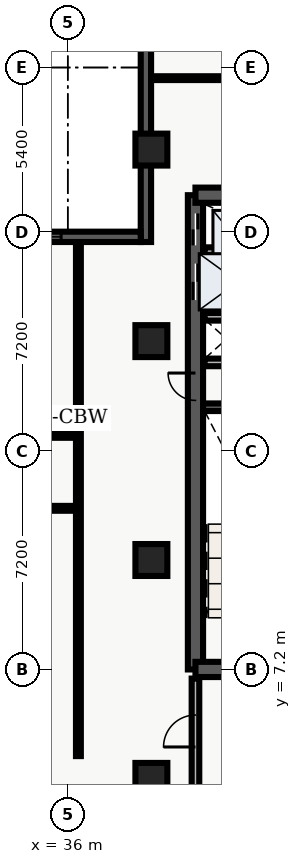
"""IFC4 building model, lengths in metres.
Left out: names, types, materials, properties, quantities, classifications, styles, units other than length and angle.
Written with IfcOpenShell. Run it as: python <this file> out.ifc"""

import sys

from ifc_helpers import new_model, entity, si_unit, converted_unit, direction, frame, origin_with_axes, origin_2d_with_axis, place, context, subcontext, project, spatial, polyline, rectangle, outline, extrude, element, fill, save


model = new_model("IFC4")
c1 = context("Model", 3, precision=1e-05, world=origin_with_axes(), true_north=direction((0.0, 1.0)))
c2 = subcontext(c1, "Body", "Model", "MODEL_VIEW")
j1 = project(units=[si_unit("LENGTHUNIT", "METRE"), converted_unit("PLANEANGLEUNIT", "DEGREE", entity("IfcPlaneAngleMeasure", 0.017), si_unit("PLANEANGLEUNIT", "RADIAN"), dimensions=[0, 0, 0, 0, 0, 0, 0])], contexts=[c1])
p1 = place(None, origin_with_axes())
s1 = spatial("IfcSite", under=j1, at=p1, CompositionType="ELEMENT")
p2 = place(p1, origin_with_axes())
s2 = spatial("IfcBuilding", under=s1, at=p2, CompositionType="ELEMENT")
p3 = place(p2, frame((0.0, 0.0, 152.4), z_axis=(0.0, 0.0, 1.0), x_axis=(1.0, 0.0, 0.0)))
s3 = spatial("IfcBuildingStorey", under=s2, at=p3, CompositionType="ELEMENT", Elevation=152.4)
p4 = place(p3, frame((40.2, 7.2, 0.0), z_axis=(0.0, 0.0, 1.0), x_axis=(0.0, 1.0, 0.0)))
e1 = element("IfcWall", 1, at=p4, inside=s3, PredefinedType="SHEAR", context=c2, shape_type="SweptSolid", body=[
    extrude(outline(polyline([(0.0, -0.25), (15.6, -0.25), (15.6, 0.25), (0.0, 0.25), (0.0, -0.25)])), origin_with_axes(), (0.0, 0.0, 1.0), 3.66),
])
p5 = place(p4, frame((14.475, 0.0, 0.0), z_axis=(0.0, 0.0, 1.0), x_axis=(1.0, 0.0, 0.0)))
e2 = element("IfcOpeningElement", 2, at=p5, cuts=e1, PredefinedType="OPENING", context=c2, shape_type="SweptSolid", body=[
    extrude(rectangle(XDim=1.05, YDim=0.52, at=origin_2d_with_axis()), origin_with_axes(), (0.0, 0.0, 1.0), 2.15),
])
p6 = place(p4, frame((12.75, 0.0, 0.0), z_axis=(0.0, 0.0, 1.0), x_axis=(1.0, 0.0, 0.0)))
e3 = element("IfcOpeningElement", 3, at=p6, cuts=e1, PredefinedType="OPENING", context=c2, shape_type="SweptSolid", body=[
    extrude(rectangle(XDim=1.2, YDim=0.52, at=origin_2d_with_axis()), origin_with_axes(), (0.0, 0.0, 1.0), 2.15),
])
p7 = place(p4, frame((9.3, 0.0, 0.0), z_axis=(0.0, 0.0, 1.0), x_axis=(1.0, 0.0, 0.0)))
e4 = element("IfcOpeningElement", 4, at=p7, cuts=e1, PredefinedType="OPENING", context=c2, shape_type="SweptSolid", body=[
    extrude(rectangle(XDim=0.9, YDim=0.52, at=origin_2d_with_axis()), origin_with_axes(), (0.0, 0.0, 1.0), 2.15),
])
p8 = place(p3, frame((40.2, 7.2, 0.0), z_axis=(0.0, 0.0, 1.0), x_axis=(1.0, 0.0, 0.0)))
e5 = element("IfcWall", 5, at=p8, inside=s3, PredefinedType="SHEAR", context=c2, shape_type="SweptSolid", body=[
    extrude(outline(polyline([(0.0, -0.25), (7.85, -0.25), (7.85, 0.25), (0.0, 0.25), (0.0, -0.25)])), origin_with_axes(), (0.0, 0.0, 1.0), 3.66),
])
p9 = place(p8, frame((2.175, 0.0, 0.0), z_axis=(0.0, 0.0, 1.0), x_axis=(1.0, 0.0, 0.0)))
e6 = element("IfcOpeningElement", 6, at=p9, cuts=e5, PredefinedType="OPENING", context=c2, shape_type="SweptSolid", body=[
    extrude(rectangle(XDim=1.05, YDim=0.52, at=origin_2d_with_axis()), origin_with_axes(), (0.0, 0.0, 1.0), 2.15),
])
p10 = place(p3, frame((40.2, 22.8, 0.0), z_axis=(0.0, 0.0, 1.0), x_axis=(1.0, 0.0, 0.0)))
e7 = element("IfcWall", 7, at=p10, inside=s3, PredefinedType="SHEAR", context=c2, shape_type="SweptSolid", body=[
    extrude(outline(polyline([(0.0, -0.25), (7.85, -0.25), (7.85, 0.25), (0.0, 0.25), (0.0, -0.25)])), origin_with_axes(), (0.0, 0.0, 1.0), 3.66),
])
p11 = place(p10, frame((5.775, 0.0, 0.0), z_axis=(0.0, 0.0, 1.0), x_axis=(1.0, 0.0, 0.0)))
e8 = element("IfcOpeningElement", 8, at=p11, cuts=e7, PredefinedType="OPENING", context=c2, shape_type="SweptSolid", body=[
    extrude(rectangle(XDim=1.05, YDim=0.52, at=origin_2d_with_axis()), origin_with_axes(), (0.0, 0.0, 1.0), 2.15),
])
p12 = place(p3, frame((40.45, 15.825, 0.0), z_axis=(0.0, 0.0, 1.0), x_axis=(1.0, 0.0, 0.0)))
e9 = element("IfcWall", 9, at=p12, inside=s3, PredefinedType="SHEAR", context=c2, shape_type="SweptSolid", body=[
    extrude(outline(polyline([(0.0, -0.125), (3.55, -0.125), (3.55, 0.125), (0.0, 0.125), (0.0, -0.125)])), origin_with_axes(), (0.0, 0.0, 1.0), 3.66),
])
p13 = place(p3, frame((40.5, 17.3, 0.0), z_axis=(0.0, 0.0, 1.0), x_axis=(1.0, 0.0, 0.0)))
e10 = element("IfcWall", 10, at=p13, inside=s3, PredefinedType="SOLIDWALL", context=c2, shape_type="SweptSolid", body=[
    extrude(outline(polyline([(0.0, -0.125), (3.5, -0.125), (3.5, 0.125), (0.0, 0.125), (0.0, -0.125)])), origin_with_axes(), (0.0, 0.0, 1.0), 2.7),
])
p14 = place(p13, frame((2.4, 0.0, 0.0), z_axis=(0.0, 0.0, 1.0), x_axis=(1.0, 0.0, 0.0)))
e11 = element("IfcOpeningElement", 11, at=p14, cuts=e10, PredefinedType="OPENING", context=c2, shape_type="SweptSolid", body=[
    extrude(rectangle(XDim=0.9, YDim=0.27, at=origin_2d_with_axis()), origin_with_axes(), (0.0, 0.0, 1.0), 2.15),
])
p15 = place(p3, frame((40.5, 18.8, 0.0), z_axis=(0.0, 0.0, 1.0), x_axis=(1.0, 0.0, 0.0)))
e12 = element("IfcWall", 12, at=p15, inside=s3, PredefinedType="SOLIDWALL", context=c2, shape_type="SweptSolid", body=[
    extrude(outline(polyline([(0.0, -0.125), (3.5, -0.125), (3.5, 0.125), (0.0, 0.125), (0.0, -0.125)])), origin_with_axes(), (0.0, 0.0, 1.0), 2.7),
])
p16 = place(p3, frame((40.2, 3.1, 0.0), z_axis=(0.0, 0.0, 1.0), x_axis=(0.0, 1.0, 0.0)))
e13 = element("IfcWall", 13, at=p16, inside=s3, PredefinedType="SOLIDWALL", context=c2, shape_type="SweptSolid", body=[
    extrude(outline(polyline([(0.0, -0.125), (3.8, -0.125), (3.8, 0.125), (0.0, 0.125), (0.0, -0.125)])), origin_with_axes(), (0.0, 0.0, 1.0), 2.7),
])
p17 = place(p16, frame((2.075, 0.0, 0.0), z_axis=(0.0, 0.0, 1.0), x_axis=(1.0, 0.0, 0.0)))
e14 = element("IfcOpeningElement", 14, at=p17, cuts=e13, PredefinedType="OPENING", context=c2, shape_type="SweptSolid", body=[
    extrude(rectangle(XDim=1.05, YDim=0.27, at=origin_2d_with_axis()), origin_with_axes(), (0.0, 0.0, 1.0), 2.15),
])
for number, where, z_axis, x_axis in (
    (15, (38.75, 3.6, 0.0), (0.0, 0.0, 1.0), (1.0, 0.0, 0.0)),
    (16, (38.75, 10.8, 0.0), (0.0, 0.0, 1.0), (1.0, 0.0, 0.0)),
    (17, (38.75, 18.0, 0.0), (0.0, 0.0, 1.0), (1.0, 0.0, 0.0)),
    (18, (38.75, 24.3, 0.0), (0.0, 0.0, 1.0), (1.0, 0.0, 0.0)),
):
    element("IfcColumn", number, at=place(p3, frame(where, z_axis=z_axis, x_axis=x_axis)), inside=s3, PredefinedType="COLUMN", context=c2, shape_type="SweptSolid", body=[
        extrude(rectangle(XDim=1.05, YDim=1.05, at=origin_2d_with_axis()), origin_with_axes(), (0.0, 0.0, 1.0), 3.9),
    ])
p18 = place(p3, frame((40.5, 20.96, 0.0), z_axis=(0.0, 0.0, 1.0), x_axis=(1.0, 0.0, 0.0)))
e19 = element("IfcWall", 19, at=p18, inside=s3, PredefinedType="SOLIDWALL", context=c2, shape_type="SweptSolid", body=[
    extrude(outline(polyline([(0.0, -0.125), (3.5, -0.125), (3.5, 0.125), (0.0, 0.125), (0.0, -0.125)])), origin_with_axes(), (0.0, 0.0, 1.0), 2.7),
])
p19 = place(p3, frame((21.15, 12.5, 0.0), z_axis=(0.0, 0.0, 1.0), x_axis=(1.0, 0.0, 0.0)))
e20 = element("IfcWall", 20, at=p19, inside=s3, PredefinedType="PARTITIONING", context=c2, shape_type="SweptSolid", body=[
    extrude(outline(polyline([(0.0, -0.08), (15.2, -0.08), (15.2, 0.08), (0.0, 0.08), (0.0, -0.08)])), origin_with_axes(), (0.0, 0.0, 1.0), 2.7),
])
p20 = place(p19, frame((2.313, 0.0, 0.0), z_axis=(0.0, 0.0, 1.0), x_axis=(1.0, 0.0, 0.0)))
e21 = element("IfcOpeningElement", 21, at=p20, cuts=e20, PredefinedType="OPENING", context=c2, shape_type="SweptSolid", body=[
    extrude(rectangle(XDim=1.0, YDim=0.18, at=origin_2d_with_axis()), origin_with_axes(), (0.0, 0.0, 1.0), 2.15),
])
p21 = place(p19, frame((6.912, 0.0, 0.0), z_axis=(0.0, 0.0, 1.0), x_axis=(1.0, 0.0, 0.0)))
e22 = element("IfcOpeningElement", 22, at=p21, cuts=e20, PredefinedType="OPENING", context=c2, shape_type="SweptSolid", body=[
    extrude(rectangle(XDim=1.0, YDim=0.18, at=origin_2d_with_axis()), origin_with_axes(), (0.0, 0.0, 1.0), 2.15),
])
p22 = place(p19, frame((12.248, 0.0, 0.0), z_axis=(0.0, 0.0, 1.0), x_axis=(1.0, 0.0, 0.0)))
e23 = element("IfcOpeningElement", 23, at=p22, cuts=e20, PredefinedType="OPENING", context=c2, shape_type="SweptSolid", body=[
    extrude(rectangle(XDim=1.2, YDim=0.18, at=origin_2d_with_axis()), origin_with_axes(), (0.0, 0.0, 1.0), 2.2),
])
p23 = place(p3, frame((21.15, 14.9, 0.0), z_axis=(0.0, 0.0, 1.0), x_axis=(1.0, 0.0, 0.0)))
e24 = element("IfcWall", 24, at=p23, inside=s3, PredefinedType="PARTITIONING", context=c2, shape_type="SweptSolid", body=[
    extrude(outline(polyline([(0.0, -0.08), (15.2, -0.08), (15.2, 0.08), (0.0, 0.08), (0.0, -0.08)])), origin_with_axes(), (0.0, 0.0, 1.0), 2.7),
])
p24 = place(p23, frame((3.47, 0.0, 0.0), z_axis=(0.0, 0.0, 1.0), x_axis=(1.0, 0.0, 0.0)))
e25 = element("IfcOpeningElement", 25, at=p24, cuts=e24, PredefinedType="OPENING", context=c2, shape_type="SweptSolid", body=[
    extrude(rectangle(XDim=1.0, YDim=0.18, at=origin_2d_with_axis()), origin_with_axes(), (0.0, 0.0, 1.0), 2.15),
])
p25 = place(p23, frame((10.94, 0.0, 0.0), z_axis=(0.0, 0.0, 1.0), x_axis=(1.0, 0.0, 0.0)))
e26 = element("IfcOpeningElement", 26, at=p25, cuts=e24, PredefinedType="OPENING", context=c2, shape_type="SweptSolid", body=[
    extrude(rectangle(XDim=1.0, YDim=0.18, at=origin_2d_with_axis()), origin_with_axes(), (0.0, 0.0, 1.0), 2.15),
])
p26 = place(p3, frame((36.35, 4.35, 0.0), z_axis=(0.0, 0.0, 1.0), x_axis=(0.0, 1.0, 0.0)))
e27 = element("IfcWall", 27, at=p26, inside=s3, PredefinedType="PARTITIONING", context=c2, shape_type="SweptSolid", body=[
    extrude(outline(polyline([(0.0, -0.08), (16.95, -0.08), (16.95, 0.08), (0.0, 0.08), (0.0, -0.08)])), origin_with_axes(), (0.0, 0.0, 1.0), 2.7),
])
p27 = place(p3, frame((38.735, 26.65, 0.0), z_axis=(0.0, 0.0, 1.0), x_axis=(1.0, 0.0, 0.0)))
e28 = element("IfcWall", 28, at=p27, inside=s3, PredefinedType="PARTITIONING", context=c2, shape_type="SweptSolid", body=[
    extrude(outline(polyline([(0.0, -0.062), (20.905, -0.062), (20.905, 0.062), (0.0, 0.062), (0.0, -0.062)])), origin_with_axes(), (0.0, 0.0, 1.0), 2.7),
])
p28 = place(p27, frame((4.265, 0.0, 0.0), z_axis=(0.0, 0.0, 1.0), x_axis=(1.0, 0.0, 0.0)))
e29 = element("IfcOpeningElement", 29, at=p28, cuts=e28, PredefinedType="OPENING", context=c2, shape_type="SweptSolid", body=[
    extrude(rectangle(XDim=1.0, YDim=0.145, at=origin_2d_with_axis()), origin_with_axes(), (0.0, 0.0, 1.0), 2.15),
])
p29 = place(p3, frame((38.57, 21.26, 0.0), z_axis=(0.0, 0.0, 1.0), x_axis=(0.0, 1.0, 0.0)))
e30 = element("IfcWall", 30, at=p29, inside=s3, PredefinedType="SOLIDWALL", context=c2, shape_type="SweptSolid", body=[
    extrude(outline(polyline([(0.0, -0.17), (7.54, -0.17), (7.54, 0.17), (0.0, 0.17), (0.0, -0.17)])), origin_with_axes(), (0.0, 0.0, 1.0), 3.66),
])
p30 = place(p3, frame((22.387, 21.43, 0.0), z_axis=(0.0, 0.0, 1.0), x_axis=(1.0, 0.0, 0.0)))
e31 = element("IfcWall", 31, at=p30, inside=s3, PredefinedType="SOLIDWALL", context=c2, shape_type="SweptSolid", body=[
    extrude(outline(polyline([(0.0, -0.17), (16.013, -0.17), (16.013, 0.17), (0.0, 0.17), (0.0, -0.17)])), origin_with_axes(), (0.0, 0.0, 1.0), 3.66),
])
p31 = place(p30, frame((3.069, 0.0, 0.45), z_axis=(0.0, 0.0, 1.0), x_axis=(1.0, 0.0, 0.0)))
e32 = element("IfcOpeningElement", 32, at=p31, cuts=e31, PredefinedType="OPENING", context=c2, shape_type="SweptSolid", body=[
    extrude(rectangle(XDim=1.8, YDim=0.36, at=origin_2d_with_axis()), origin_with_axes(), (0.0, 0.0, 1.0), 2.1),
])
p32 = place(p30, frame((8.006, 0.0, 0.45), z_axis=(0.0, 0.0, 1.0), x_axis=(1.0, 0.0, 0.0)))
e33 = element("IfcOpeningElement", 33, at=p32, cuts=e31, PredefinedType="OPENING", context=c2, shape_type="SweptSolid", body=[
    extrude(rectangle(XDim=1.8, YDim=0.36, at=origin_2d_with_axis()), origin_with_axes(), (0.0, 0.0, 1.0), 2.1),
])
p33 = place(p30, frame((12.494, 0.0, 0.45), z_axis=(0.0, 0.0, 1.0), x_axis=(1.0, 0.0, 0.0)))
e34 = element("IfcOpeningElement", 34, at=p33, cuts=e31, PredefinedType="OPENING", context=c2, shape_type="SweptSolid", body=[
    extrude(rectangle(XDim=1.8, YDim=0.36, at=origin_2d_with_axis()), origin_with_axes(), (0.0, 0.0, 1.0), 2.1),
])
p34 = place(p4, frame((14.475, 0.0, 0.0), z_axis=(0.0, 0.0, 1.0), x_axis=(1.0, 0.0, 0.0)))
e35 = element("IfcDoor", 35, at=p34, inside=s3, OperationType="SLIDING_TO_RIGHT", PredefinedType="DOOR", context=c2, shape_type="SweptSolid", body=[
    extrude(rectangle(XDim=1.05, YDim=0.09, at=origin_2d_with_axis()), origin_with_axes(), (0.0, 0.0, 1.0), 2.15),
])
fill(e2, e35)
p35 = place(p4, frame((12.75, 0.0, 0.0), z_axis=(0.0, 0.0, 1.0), x_axis=(1.0, 0.0, 0.0)))
e36 = element("IfcDoor", 36, at=p35, inside=s3, OperationType="DOUBLE_DOOR_SLIDING", PredefinedType="DOOR", context=c2, shape_type="SweptSolid", body=[
    extrude(rectangle(XDim=1.2, YDim=0.09, at=origin_2d_with_axis()), origin_with_axes(), (0.0, 0.0, 1.0), 2.15),
])
fill(e3, e36)
p36 = place(p4, frame((9.3, 0.0, 0.0), z_axis=(0.0, 0.0, 1.0), x_axis=(1.0, 0.0, 0.0)))
e37 = element("IfcDoor", 37, at=p36, inside=s3, OperationType="SINGLE_SWING_RIGHT", PredefinedType="DOOR", context=c2, shape_type="SweptSolid", body=[
    extrude(rectangle(XDim=0.9, YDim=0.09, at=origin_2d_with_axis()), origin_with_axes(), (0.0, 0.0, 1.0), 2.15),
])
fill(e4, e37)
p37 = place(p16, frame((2.075, 0.0, 0.0), z_axis=(0.0, 0.0, 1.0), x_axis=(1.0, 0.0, 0.0)))
e38 = element("IfcDoor", 38, at=p37, inside=s3, OperationType="SINGLE_SWING_LEFT", PredefinedType="DOOR", context=c2, shape_type="SweptSolid", body=[
    extrude(rectangle(XDim=1.05, YDim=0.09, at=origin_2d_with_axis()), origin_with_axes(), (0.0, 0.0, 1.0), 2.15),
])
fill(e14, e38)
p38 = place(p30, frame((12.494, 0.0, 0.45), z_axis=(0.0, 0.0, 1.0), x_axis=(1.0, 0.0, 0.0)))
e39 = element("IfcWindow", 39, at=p38, inside=s3, PredefinedType="WINDOW", context=c2, shape_type="SweptSolid", body=[
    extrude(rectangle(XDim=1.8, YDim=0.09, at=origin_2d_with_axis()), origin_with_axes(), (0.0, 0.0, 1.0), 2.1),
])
fill(e34, e39)
save(model, sys.argv[1])
